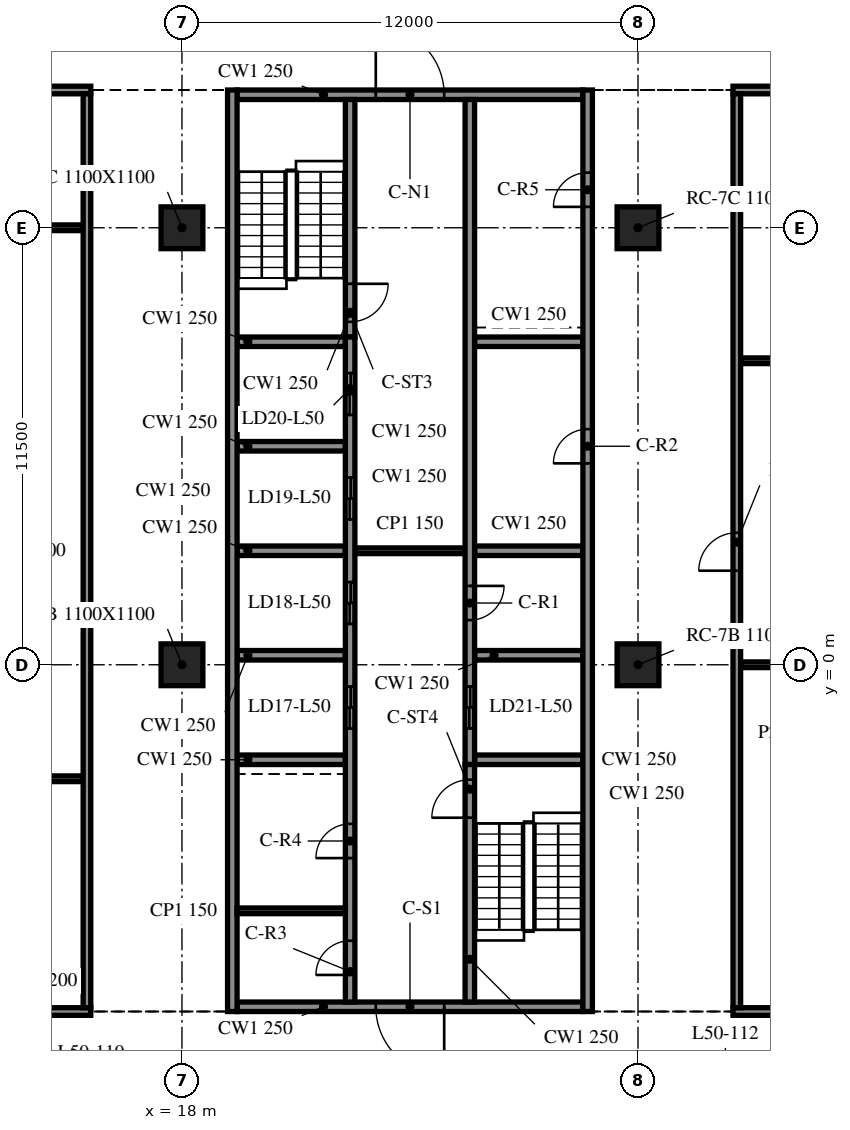
"""IFC4 building model, lengths in metres.
Left out: names, types, materials, properties, quantities, classifications, styles, units other than length and angle.
Written with IfcOpenShell. Run it as: python <this file> out.ifc"""

import sys

from ifc_helpers import new_model, si_unit, direction, frame, frame_2d, origin, origin_2d, place, context, subcontext, project, spatial, rectangle, extrude, element, fill, save


model = new_model("IFC4")
c1 = context("Model", 3, precision=1e-05, world=origin(), true_north=direction((0.0, 1.0)))
c2 = subcontext(c1, "Body", "Model", "MODEL_VIEW")
j1 = project(units=[si_unit("LENGTHUNIT", "METRE"), si_unit("PLANEANGLEUNIT", "RADIAN")], contexts=[c1])
p1 = place(None, origin())
s1 = spatial("IfcSite", under=j1, at=p1, CompositionType="ELEMENT")
p2 = place(p1, origin())
s2 = spatial("IfcBuilding", under=s1, at=p2, CompositionType="ELEMENT")
p3 = place(p2, frame((0.0, 0.0, 209.1)))
s3 = spatial("IfcBuildingStorey", under=s2, at=p3, CompositionType="ELEMENT", Elevation=209.1)
for number, where, z_axis, x_axis in (
    (1, (18.0, 0.0, -0.34), (0.0, 0.0, 1.0), (1.0, 0.0, 0.0)),
    (2, (18.0, 11.5, -0.34), (0.0, 0.0, 1.0), (1.0, 0.0, 0.0)),
    (3, (30.0, 0.0, -0.34), (0.0, 0.0, 1.0), (1.0, 0.0, 0.0)),
    (4, (30.0, 11.5, -0.34), (0.0, 0.0, 1.0), (1.0, 0.0, 0.0)),
):
    element("IfcColumn", number, at=place(p3, frame(where, z_axis=z_axis, x_axis=x_axis)), inside=s3, PredefinedType="COLUMN", context=c2, shape_type="SweptSolid", body=[
        extrude(rectangle(XDim=1.1, YDim=1.1, at=origin_2d()), origin(), (0.0, 0.0, 1.0), 3.8),
    ])
p4 = place(p3, frame((19.325, 15.125, 0.0), z_axis=(0.0, 0.0, 1.0), x_axis=(0.0, -1.0, 0.0)))
e5 = element("IfcWall", 5, at=p4, inside=s3, PredefinedType="SOLIDWALL", context=c2, shape_type="SweptSolid", body=[
    extrude(rectangle(XDim=24.25, YDim=0.25, at=frame_2d((12.125, 0.0))), origin(), (0.0, 0.0, 1.0), 3.46),
])
p5 = place(p3, frame((28.675, -9.125, 0.0), z_axis=(0.0, 0.0, 1.0), x_axis=(0.0, 1.0, 0.0)))
e6 = element("IfcWall", 6, at=p5, inside=s3, PredefinedType="SOLIDWALL", context=c2, shape_type="SweptSolid", body=[
    extrude(rectangle(XDim=24.25, YDim=0.25, at=frame_2d((12.125, 0.0))), origin(), (0.0, 0.0, 1.0), 3.46),
])
p6 = place(p5, frame((14.425, 0.0, 0.0)))
e7 = element("IfcOpeningElement", 7, at=p6, cuts=e6, PredefinedType="OPENING", context=c2, shape_type="SweptSolid", body=[
    extrude(rectangle(XDim=0.9, YDim=2.1, at=frame_2d((0.45, 1.05))), frame((0.0, 0.135, 0.0), z_axis=(0.0, -1.0, 0.0), x_axis=(1.0, 0.0, 0.0)), (0.0, 0.0, 1.0), 0.27),
])
p7 = place(p5, frame((21.175, 0.0, 0.0)))
e8 = element("IfcOpeningElement", 8, at=p7, cuts=e6, PredefinedType="OPENING", context=c2, shape_type="SweptSolid", body=[
    extrude(rectangle(XDim=0.9, YDim=2.1, at=frame_2d((0.45, 1.05))), frame((0.0, 0.135, 0.0), z_axis=(0.0, -1.0, 0.0), x_axis=(1.0, 0.0, 0.0)), (0.0, 0.0, 1.0), 0.27),
])
p8 = place(p3, frame((28.55, -9.0, 0.0), z_axis=(0.0, 0.0, 1.0), x_axis=(-1.0, 0.0, 0.0)))
e9 = element("IfcWall", 9, at=p8, inside=s3, PredefinedType="SOLIDWALL", context=c2, shape_type="SweptSolid", body=[
    extrude(rectangle(XDim=9.1, YDim=0.25, at=frame_2d((4.55, 0.0))), origin(), (0.0, 0.0, 1.0), 3.46),
])
p9 = place(p8, frame((3.65, 0.0, 0.0)))
e10 = element("IfcOpeningElement", 10, at=p9, cuts=e9, PredefinedType="OPENING", context=c2, shape_type="SweptSolid", body=[
    extrude(rectangle(XDim=1.8, YDim=2.1, at=frame_2d((0.9, 1.05))), frame((0.0, 0.135, 0.0), z_axis=(0.0, -1.0, 0.0), x_axis=(1.0, 0.0, 0.0)), (0.0, 0.0, 1.0), 0.27),
])
p10 = place(p3, frame((19.45, 15.0, 0.0), z_axis=(0.0, 0.0, 1.0), x_axis=(1.0, 0.0, 0.0)))
e11 = element("IfcWall", 11, at=p10, inside=s3, PredefinedType="SOLIDWALL", context=c2, shape_type="SweptSolid", body=[
    extrude(rectangle(XDim=9.1, YDim=0.25, at=frame_2d((4.55, 0.0))), origin(), (0.0, 0.0, 1.0), 3.46),
])
p11 = place(p10, frame((3.65, 0.0, 0.0)))
e12 = element("IfcOpeningElement", 12, at=p11, cuts=e11, PredefinedType="OPENING", context=c2, shape_type="SweptSolid", body=[
    extrude(rectangle(XDim=1.8, YDim=2.1, at=frame_2d((0.9, 1.05))), frame((0.0, 0.135, 0.0), z_axis=(0.0, -1.0, 0.0), x_axis=(1.0, 0.0, 0.0)), (0.0, 0.0, 1.0), 0.27),
])
p12 = place(p3, frame((22.425, -8.875, 0.0), z_axis=(0.0, 0.0, 1.0), x_axis=(0.0, 1.0, 0.0)))
e13 = element("IfcWall", 13, at=p12, inside=s3, PredefinedType="SOLIDWALL", context=c2, shape_type="SweptSolid", body=[
    extrude(rectangle(XDim=17.5, YDim=0.25, at=frame_2d((8.75, 0.0))), origin(), (0.0, 0.0, 1.0), 3.46),
])
p13 = place(p12, frame((7.2, 0.0, 0.0)))
e14 = element("IfcOpeningElement", 14, at=p13, cuts=e13, PredefinedType="OPENING", context=c2, shape_type="SweptSolid", body=[
    extrude(rectangle(XDim=1.1, YDim=2.1, at=frame_2d((0.55, 1.05))), frame((0.0, 0.135, 0.0), z_axis=(0.0, -1.0, 0.0), x_axis=(1.0, 0.0, 0.0)), (0.0, 0.0, 1.0), 0.27),
])
p14 = place(p12, frame((9.95, 0.0, 0.0)))
e15 = element("IfcOpeningElement", 15, at=p14, cuts=e13, PredefinedType="OPENING", context=c2, shape_type="SweptSolid", body=[
    extrude(rectangle(XDim=1.1, YDim=2.1, at=frame_2d((0.55, 1.05))), frame((0.0, 0.135, 0.0), z_axis=(0.0, -1.0, 0.0), x_axis=(1.0, 0.0, 0.0)), (0.0, 0.0, 1.0), 0.27),
])
p15 = place(p12, frame((12.7, 0.0, 0.0)))
e16 = element("IfcOpeningElement", 16, at=p15, cuts=e13, PredefinedType="OPENING", context=c2, shape_type="SweptSolid", body=[
    extrude(rectangle(XDim=1.1, YDim=2.1, at=frame_2d((0.55, 1.05))), frame((0.0, 0.135, 0.0), z_axis=(0.0, -1.0, 0.0), x_axis=(1.0, 0.0, 0.0)), (0.0, 0.0, 1.0), 0.27),
])
p16 = place(p12, frame((15.45, 0.0, 0.0)))
e17 = element("IfcOpeningElement", 17, at=p16, cuts=e13, PredefinedType="OPENING", context=c2, shape_type="SweptSolid", body=[
    extrude(rectangle(XDim=1.1, YDim=2.1, at=frame_2d((0.55, 1.05))), frame((0.0, 0.135, 0.0), z_axis=(0.0, -1.0, 0.0), x_axis=(1.0, 0.0, 0.0)), (0.0, 0.0, 1.0), 0.27),
])
p17 = place(p12, frame((0.712, 0.0, 0.0)))
e18 = element("IfcOpeningElement", 18, at=p17, cuts=e13, PredefinedType="OPENING", context=c2, shape_type="SweptSolid", body=[
    extrude(rectangle(XDim=0.9, YDim=2.1, at=frame_2d((0.45, 1.05))), frame((0.0, 0.135, 0.0), z_axis=(0.0, -1.0, 0.0), x_axis=(1.0, 0.0, 0.0)), (0.0, 0.0, 1.0), 0.27),
])
p18 = place(p12, frame((3.788, 0.0, 0.0)))
e19 = element("IfcOpeningElement", 19, at=p18, cuts=e13, PredefinedType="OPENING", context=c2, shape_type="SweptSolid", body=[
    extrude(rectangle(XDim=0.9, YDim=2.1, at=frame_2d((0.45, 1.05))), frame((0.0, 0.135, 0.0), z_axis=(0.0, -1.0, 0.0), x_axis=(1.0, 0.0, 0.0)), (0.0, 0.0, 1.0), 0.27),
])
p19 = place(p3, frame((22.425, 14.875, 0.0), z_axis=(0.0, 0.0, 1.0), x_axis=(0.0, -1.0, 0.0)))
e20 = element("IfcWall", 20, at=p19, inside=s3, PredefinedType="SOLIDWALL", context=c2, shape_type="SweptSolid", body=[
    extrude(rectangle(XDim=6.25, YDim=0.25, at=frame_2d((3.125, 0.0))), origin(), (0.0, 0.0, 1.0), 3.46),
])
p20 = place(p19, frame((4.85, 0.0, 0.0)))
e21 = element("IfcOpeningElement", 21, at=p20, cuts=e20, PredefinedType="OPENING", context=c2, shape_type="SweptSolid", body=[
    extrude(rectangle(XDim=1.0, YDim=2.1, at=frame_2d((0.5, 1.05))), frame((0.0, 0.135, 0.0), z_axis=(0.0, -1.0, 0.0), x_axis=(1.0, 0.0, 0.0)), (0.0, 0.0, 1.0), 0.27),
])
p21 = place(p3, frame((25.575, -8.875, 0.0), z_axis=(0.0, 0.0, 1.0), x_axis=(0.0, 1.0, 0.0)))
e22 = element("IfcWall", 22, at=p21, inside=s3, PredefinedType="SOLIDWALL", context=c2, shape_type="SweptSolid", body=[
    extrude(rectangle(XDim=6.25, YDim=0.25, at=frame_2d((3.125, 0.0))), origin(), (0.0, 0.0, 1.0), 3.46),
])
p22 = place(p21, frame((4.85, 0.0, 0.0)))
e23 = element("IfcOpeningElement", 23, at=p22, cuts=e22, PredefinedType="OPENING", context=c2, shape_type="SweptSolid", body=[
    extrude(rectangle(XDim=1.0, YDim=2.1, at=frame_2d((0.5, 1.05))), frame((0.0, 0.135, 0.0), z_axis=(0.0, -1.0, 0.0), x_axis=(1.0, 0.0, 0.0)), (0.0, 0.0, 1.0), 0.27),
])
p23 = place(p3, frame((25.575, 14.875, 0.0), z_axis=(0.0, 0.0, 1.0), x_axis=(0.0, -1.0, 0.0)))
e24 = element("IfcWall", 24, at=p23, inside=s3, PredefinedType="SOLIDWALL", context=c2, shape_type="SweptSolid", body=[
    extrude(rectangle(XDim=17.5, YDim=0.25, at=frame_2d((8.75, 0.0))), origin(), (0.0, 0.0, 1.0), 3.46),
])
p24 = place(p23, frame((15.45, 0.0, 0.0)))
e25 = element("IfcOpeningElement", 25, at=p24, cuts=e24, PredefinedType="OPENING", context=c2, shape_type="SweptSolid", body=[
    extrude(rectangle(XDim=1.1, YDim=2.1, at=frame_2d((0.55, 1.05))), frame((0.0, 0.135, 0.0), z_axis=(0.0, -1.0, 0.0), x_axis=(1.0, 0.0, 0.0)), (0.0, 0.0, 1.0), 0.27),
])
p25 = place(p23, frame((12.8, 0.0, 0.0)))
e26 = element("IfcOpeningElement", 26, at=p25, cuts=e24, PredefinedType="OPENING", context=c2, shape_type="SweptSolid", body=[
    extrude(rectangle(XDim=0.9, YDim=2.1, at=frame_2d((0.45, 1.05))), frame((0.0, 0.135, 0.0), z_axis=(0.0, -1.0, 0.0), x_axis=(1.0, 0.0, 0.0)), (0.0, 0.0, 1.0), 0.27),
])
for number, where, z_axis, x_axis in (
    (27, (19.45, -2.5, 0.0), (0.0, 0.0, 1.0), (1.0, 0.0, 0.0)),
    (28, (19.45, 0.25, 0.0), (0.0, 0.0, 1.0), (1.0, 0.0, 0.0)),
    (29, (19.45, 3.0, 0.0), (0.0, 0.0, 1.0), (1.0, 0.0, 0.0)),
    (30, (19.45, 5.75, 0.0), (0.0, 0.0, 1.0), (1.0, 0.0, 0.0)),
    (31, (19.45, 8.5, 0.0), (0.0, 0.0, 1.0), (1.0, 0.0, 0.0)),
    (32, (25.7, -2.5, 0.0), (0.0, 0.0, 1.0), (1.0, 0.0, 0.0)),
    (33, (25.7, 0.25, 0.0), (0.0, 0.0, 1.0), (1.0, 0.0, 0.0)),
    (34, (25.7, 3.0, 0.0), (0.0, 0.0, 1.0), (1.0, 0.0, 0.0)),
    (35, (25.7, 8.5, 0.0), (0.0, 0.0, 1.0), (1.0, 0.0, 0.0)),
):
    element("IfcWall", number, at=place(p3, frame(where, z_axis=z_axis, x_axis=x_axis)), inside=s3, PredefinedType="SOLIDWALL", context=c2, shape_type="SweptSolid", body=[
        extrude(rectangle(XDim=2.85, YDim=0.25, at=frame_2d((1.425, 0.0))), origin(), (0.0, 0.0, 1.0), 3.46),
    ])
p26 = place(p3, frame((22.55, 3.0, 0.0), z_axis=(0.0, 0.0, 1.0), x_axis=(1.0, 0.0, 0.0)))
e36 = element("IfcWall", 36, at=p26, inside=s3, PredefinedType="PARTITIONING", context=c2, shape_type="SweptSolid", body=[
    extrude(rectangle(XDim=2.9, YDim=0.15, at=frame_2d((1.45, 0.0))), origin(), (0.0, 0.0, 1.0), 3.46),
])
p27 = place(p3, frame((19.45, -6.475, 0.0), z_axis=(0.0, 0.0, 1.0), x_axis=(1.0, 0.0, 0.0)))
e37 = element("IfcWall", 37, at=p27, inside=s3, PredefinedType="PARTITIONING", context=c2, shape_type="SweptSolid", body=[
    extrude(rectangle(XDim=2.85, YDim=0.15, at=frame_2d((1.425, 0.0))), origin(), (0.0, 0.0, 1.0), 3.46),
])
p28 = place(p3, frame((8.3, -9.125, 0.0), z_axis=(0.0, 0.0, 1.0), x_axis=(1.0, 0.0, 0.0)))
e38 = element("IfcWall", 38, at=p28, inside=s3, PredefinedType="PARTITIONING", context=c2, shape_type="SweptSolid", body=[
    extrude(rectangle(XDim=7.3, YDim=0.2, at=frame_2d((3.65, 0.0))), origin(), (0.0, 0.0, 1.0), 3.46),
])
p29 = place(p28, frame((3.1, 0.0, 0.0)))
e39 = element("IfcOpeningElement", 39, at=p29, cuts=e38, PredefinedType="OPENING", context=c2, shape_type="SweptSolid", body=[
    extrude(rectangle(XDim=0.9, YDim=2.1, at=frame_2d((0.45, 1.05))), frame((0.0, 0.11, 0.0), z_axis=(0.0, -1.0, 0.0), x_axis=(1.0, 0.0, 0.0)), (0.0, 0.0, 1.0), 0.22),
])
p30 = place(p3, frame((32.5, -9.125, 0.0), z_axis=(0.0, 0.0, 1.0), x_axis=(1.0, 0.0, 0.0)))
e40 = element("IfcWall", 40, at=p30, inside=s3, PredefinedType="PARTITIONING", context=c2, shape_type="SweptSolid", body=[
    extrude(rectangle(XDim=21.35, YDim=0.2, at=frame_2d((10.675, 0.0))), origin(), (0.0, 0.0, 1.0), 3.46),
])
p31 = place(p30, frame((10.1, 0.0, 0.0)))
e41 = element("IfcOpeningElement", 41, at=p31, cuts=e40, PredefinedType="OPENING", context=c2, shape_type="SweptSolid", body=[
    extrude(rectangle(XDim=1.0, YDim=2.1, at=frame_2d((0.5, 1.05))), frame((0.0, 0.11, 0.0), z_axis=(0.0, -1.0, 0.0), x_axis=(1.0, 0.0, 0.0)), (0.0, 0.0, 1.0), 0.22),
])
p32 = place(p3, frame((8.5, -3.0, 0.0), z_axis=(0.0, 0.0, 1.0), x_axis=(1.0, 0.0, 0.0)))
e42 = element("IfcWall", 42, at=p32, inside=s3, PredefinedType="PARTITIONING", context=c2, shape_type="SweptSolid", body=[
    extrude(rectangle(XDim=6.9, YDim=0.15, at=frame_2d((3.45, 0.0))), origin(), (0.0, 0.0, 1.0), 3.46),
])
p33 = place(p3, frame((32.7, 0.0, 0.0), z_axis=(0.0, 0.0, 1.0), x_axis=(1.0, 0.0, 0.0)))
e43 = element("IfcWall", 43, at=p33, inside=s3, PredefinedType="PARTITIONING", context=c2, shape_type="SweptSolid", body=[
    extrude(rectangle(XDim=8.75, YDim=0.15, at=frame_2d((4.375, 0.0))), origin(), (0.0, 0.0, 1.0), 3.46),
])
p34 = place(p3, frame((32.7, 8.0, 0.0), z_axis=(0.0, 0.0, 1.0), x_axis=(1.0, 0.0, 0.0)))
e44 = element("IfcWall", 44, at=p34, inside=s3, PredefinedType="PARTITIONING", context=c2, shape_type="SweptSolid", body=[
    extrude(rectangle(XDim=21.15, YDim=0.15, at=frame_2d((10.575, 0.0))), origin(), (0.0, 0.0, 1.0), 3.46),
])
p35 = place(p3, frame((8.5, 11.5, 0.0), z_axis=(0.0, 0.0, 1.0), x_axis=(1.0, 0.0, 0.0)))
e45 = element("IfcWall", 45, at=p35, inside=s3, PredefinedType="PARTITIONING", context=c2, shape_type="SweptSolid", body=[
    extrude(rectangle(XDim=6.9, YDim=0.15, at=frame_2d((3.45, 0.0))), origin(), (0.0, 0.0, 1.0), 3.46),
])
p36 = place(p3, frame((8.3, 15.125, 0.0), z_axis=(0.0, 0.0, 1.0), x_axis=(1.0, 0.0, 0.0)))
e46 = element("IfcWall", 46, at=p36, inside=s3, PredefinedType="PARTITIONING", context=c2, shape_type="SweptSolid", body=[
    extrude(rectangle(XDim=7.3, YDim=0.2, at=frame_2d((3.65, 0.0))), origin(), (0.0, 0.0, 1.0), 3.46),
])
p37 = place(p36, frame((3.1, 0.0, 0.0)))
e47 = element("IfcOpeningElement", 47, at=p37, cuts=e46, PredefinedType="OPENING", context=c2, shape_type="SweptSolid", body=[
    extrude(rectangle(XDim=0.9, YDim=2.1, at=frame_2d((0.45, 1.05))), frame((0.0, 0.11, 0.0), z_axis=(0.0, -1.0, 0.0), x_axis=(1.0, 0.0, 0.0)), (0.0, 0.0, 1.0), 0.22),
])
p38 = place(p3, frame((32.5, 15.125, 0.0), z_axis=(0.0, 0.0, 1.0), x_axis=(1.0, 0.0, 0.0)))
e48 = element("IfcWall", 48, at=p38, inside=s3, PredefinedType="PARTITIONING", context=c2, shape_type="SweptSolid", body=[
    extrude(rectangle(XDim=21.35, YDim=0.2, at=frame_2d((10.675, 0.0))), origin(), (0.0, 0.0, 1.0), 3.46),
])
p39 = place(p38, frame((10.3, 0.0, 0.0)))
e49 = element("IfcOpeningElement", 49, at=p39, cuts=e48, PredefinedType="OPENING", context=c2, shape_type="SweptSolid", body=[
    extrude(rectangle(XDim=0.9, YDim=2.1, at=frame_2d((0.45, 1.05))), frame((0.0, 0.11, 0.0), z_axis=(0.0, -1.0, 0.0), x_axis=(1.0, 0.0, 0.0)), (0.0, 0.0, 1.0), 0.22),
])
p40 = place(p3, frame((15.5, -9.025, 0.0), z_axis=(0.0, 0.0, 1.0), x_axis=(0.0, 1.0, 0.0)))
e50 = element("IfcWall", 50, at=p40, inside=s3, PredefinedType="PARTITIONING", context=c2, shape_type="SweptSolid", body=[
    extrude(rectangle(XDim=24.05, YDim=0.2, at=frame_2d((12.025, 0.0))), origin(), (0.0, 0.0, 1.0), 3.46),
])
p41 = place(p3, frame((32.6, -9.025, 0.0), z_axis=(0.0, 0.0, 1.0), x_axis=(0.0, 1.0, 0.0)))
e51 = element("IfcWall", 51, at=p41, inside=s3, PredefinedType="PARTITIONING", context=c2, shape_type="SweptSolid", body=[
    extrude(rectangle(XDim=24.05, YDim=0.2, at=frame_2d((12.025, 0.0))), origin(), (0.0, 0.0, 1.0), 3.46),
])
p42 = place(p41, frame((11.5, 0.0, 0.0)))
e52 = element("IfcOpeningElement", 52, at=p42, cuts=e51, PredefinedType="OPENING", context=c2, shape_type="SweptSolid", body=[
    extrude(rectangle(XDim=1.0, YDim=2.1, at=frame_2d((0.5, 1.05))), frame((0.0, 0.11, 0.0), z_axis=(0.0, -1.0, 0.0), x_axis=(1.0, 0.0, 0.0)), (0.0, 0.0, 1.0), 0.22),
])
p43 = place(p9, origin())
e53 = element("IfcDoor", 53, at=p43, inside=s3, OperationType="DOUBLE_DOOR_SINGLE_SWING", PredefinedType="DOOR", context=c2, shape_type="SweptSolid", body=[
    extrude(rectangle(XDim=1.8, YDim=2.1, at=frame_2d((0.9, 1.05))), frame((0.0, 0.025, 0.0), z_axis=(0.0, -1.0, 0.0), x_axis=(1.0, 0.0, 0.0)), (0.0, 0.0, 1.0), 0.05),
])
fill(e10, e53)
p44 = place(p11, origin())
e54 = element("IfcDoor", 54, at=p44, inside=s3, OperationType="DOUBLE_DOOR_SINGLE_SWING", PredefinedType="DOOR", context=c2, shape_type="SweptSolid", body=[
    extrude(rectangle(XDim=1.8, YDim=2.1, at=frame_2d((0.9, 1.05))), frame((0.0, 0.025, 0.0), z_axis=(0.0, -1.0, 0.0), x_axis=(1.0, 0.0, 0.0)), (0.0, 0.0, 1.0), 0.05),
])
fill(e12, e54)
p45 = place(p24, origin())
e55 = element("IfcDoor", 55, at=p45, inside=s3, OperationType="DOUBLE_DOOR_SLIDING", PredefinedType="DOOR", context=c2, shape_type="SweptSolid", body=[
    extrude(rectangle(XDim=1.1, YDim=2.1, at=frame_2d((0.55, 1.05))), frame((0.0, 0.025, 0.0), z_axis=(0.0, -1.0, 0.0), x_axis=(1.0, 0.0, 0.0)), (0.0, 0.0, 1.0), 0.05),
])
fill(e25, e55)
p46 = place(p13, origin())
e56 = element("IfcDoor", 56, at=p46, inside=s3, OperationType="DOUBLE_DOOR_SLIDING", PredefinedType="DOOR", context=c2, shape_type="SweptSolid", body=[
    extrude(rectangle(XDim=1.1, YDim=2.1, at=frame_2d((0.55, 1.05))), frame((0.0, 0.025, 0.0), z_axis=(0.0, -1.0, 0.0), x_axis=(1.0, 0.0, 0.0)), (0.0, 0.0, 1.0), 0.05),
])
fill(e14, e56)
p47 = place(p14, origin())
e57 = element("IfcDoor", 57, at=p47, inside=s3, OperationType="DOUBLE_DOOR_SLIDING", PredefinedType="DOOR", context=c2, shape_type="SweptSolid", body=[
    extrude(rectangle(XDim=1.1, YDim=2.1, at=frame_2d((0.55, 1.05))), frame((0.0, 0.025, 0.0), z_axis=(0.0, -1.0, 0.0), x_axis=(1.0, 0.0, 0.0)), (0.0, 0.0, 1.0), 0.05),
])
fill(e15, e57)
p48 = place(p15, origin())
e58 = element("IfcDoor", 58, at=p48, inside=s3, OperationType="DOUBLE_DOOR_SLIDING", PredefinedType="DOOR", context=c2, shape_type="SweptSolid", body=[
    extrude(rectangle(XDim=1.1, YDim=2.1, at=frame_2d((0.55, 1.05))), frame((0.0, 0.025, 0.0), z_axis=(0.0, -1.0, 0.0), x_axis=(1.0, 0.0, 0.0)), (0.0, 0.0, 1.0), 0.05),
])
fill(e16, e58)
p49 = place(p16, origin())
e59 = element("IfcDoor", 59, at=p49, inside=s3, OperationType="DOUBLE_DOOR_SLIDING", PredefinedType="DOOR", context=c2, shape_type="SweptSolid", body=[
    extrude(rectangle(XDim=1.1, YDim=2.1, at=frame_2d((0.55, 1.05))), frame((0.0, 0.025, 0.0), z_axis=(0.0, -1.0, 0.0), x_axis=(1.0, 0.0, 0.0)), (0.0, 0.0, 1.0), 0.05),
])
fill(e17, e59)
p50 = place(p25, origin())
e60 = element("IfcDoor", 60, at=p50, inside=s3, OperationType="SINGLE_SWING_LEFT", PredefinedType="DOOR", context=c2, shape_type="SweptSolid", body=[
    extrude(rectangle(XDim=0.9, YDim=2.1, at=frame_2d((0.45, 1.05))), frame((0.0, 0.025, 0.0), z_axis=(0.0, -1.0, 0.0), x_axis=(1.0, 0.0, 0.0)), (0.0, 0.0, 1.0), 0.05),
])
fill(e26, e60)
p51 = place(p6, origin())
e61 = element("IfcDoor", 61, at=p51, inside=s3, OperationType="SINGLE_SWING_RIGHT", PredefinedType="DOOR", context=c2, shape_type="SweptSolid", body=[
    extrude(rectangle(XDim=0.9, YDim=2.1, at=frame_2d((0.45, 1.05))), frame((0.0, 0.025, 0.0), z_axis=(0.0, -1.0, 0.0), x_axis=(1.0, 0.0, 0.0)), (0.0, 0.0, 1.0), 0.05),
])
fill(e7, e61)
p52 = place(p17, origin())
e62 = element("IfcDoor", 62, at=p52, inside=s3, OperationType="SINGLE_SWING_LEFT", PredefinedType="DOOR", context=c2, shape_type="SweptSolid", body=[
    extrude(rectangle(XDim=0.9, YDim=2.1, at=frame_2d((0.45, 1.05))), frame((0.0, 0.025, 0.0), z_axis=(0.0, -1.0, 0.0), x_axis=(1.0, 0.0, 0.0)), (0.0, 0.0, 1.0), 0.05),
])
fill(e18, e62)
p53 = place(p18, origin())
e63 = element("IfcDoor", 63, at=p53, inside=s3, OperationType="SINGLE_SWING_RIGHT", PredefinedType="DOOR", context=c2, shape_type="SweptSolid", body=[
    extrude(rectangle(XDim=0.9, YDim=2.1, at=frame_2d((0.45, 1.05))), frame((0.0, 0.025, 0.0), z_axis=(0.0, -1.0, 0.0), x_axis=(1.0, 0.0, 0.0)), (0.0, 0.0, 1.0), 0.05),
])
fill(e19, e63)
p54 = place(p7, origin())
e64 = element("IfcDoor", 64, at=p54, inside=s3, OperationType="SINGLE_SWING_LEFT", PredefinedType="DOOR", context=c2, shape_type="SweptSolid", body=[
    extrude(rectangle(XDim=0.9, YDim=2.1, at=frame_2d((0.45, 1.05))), frame((0.0, 0.025, 0.0), z_axis=(0.0, -1.0, 0.0), x_axis=(1.0, 0.0, 0.0)), (0.0, 0.0, 1.0), 0.05),
])
fill(e8, e64)
p55 = place(p20, origin())
e65 = element("IfcDoor", 65, at=p55, inside=s3, OperationType="SINGLE_SWING_RIGHT", PredefinedType="DOOR", context=c2, shape_type="SweptSolid", body=[
    extrude(rectangle(XDim=1.0, YDim=2.1, at=frame_2d((0.5, 1.05))), frame((0.0, 0.025, 0.0), z_axis=(0.0, -1.0, 0.0), x_axis=(1.0, 0.0, 0.0)), (0.0, 0.0, 1.0), 0.05),
])
fill(e21, e65)
p56 = place(p22, origin())
e66 = element("IfcDoor", 66, at=p56, inside=s3, OperationType="SINGLE_SWING_LEFT", PredefinedType="DOOR", context=c2, shape_type="SweptSolid", body=[
    extrude(rectangle(XDim=1.0, YDim=2.1, at=frame_2d((0.5, 1.05))), frame((0.0, 0.025, 0.0), z_axis=(0.0, -1.0, 0.0), x_axis=(1.0, 0.0, 0.0)), (0.0, 0.0, 1.0), 0.05),
])
fill(e23, e66)
p57 = place(p42, origin())
e67 = element("IfcDoor", 67, at=p57, inside=s3, OperationType="SINGLE_SWING_RIGHT", PredefinedType="DOOR", context=c2, shape_type="SweptSolid", body=[
    extrude(rectangle(XDim=1.0, YDim=2.1, at=frame_2d((0.5, 1.05))), frame((0.0, 0.025, 0.0), z_axis=(0.0, -1.0, 0.0), x_axis=(1.0, 0.0, 0.0)), (0.0, 0.0, 1.0), 0.05),
])
fill(e52, e67)
save(model, sys.argv[1])
